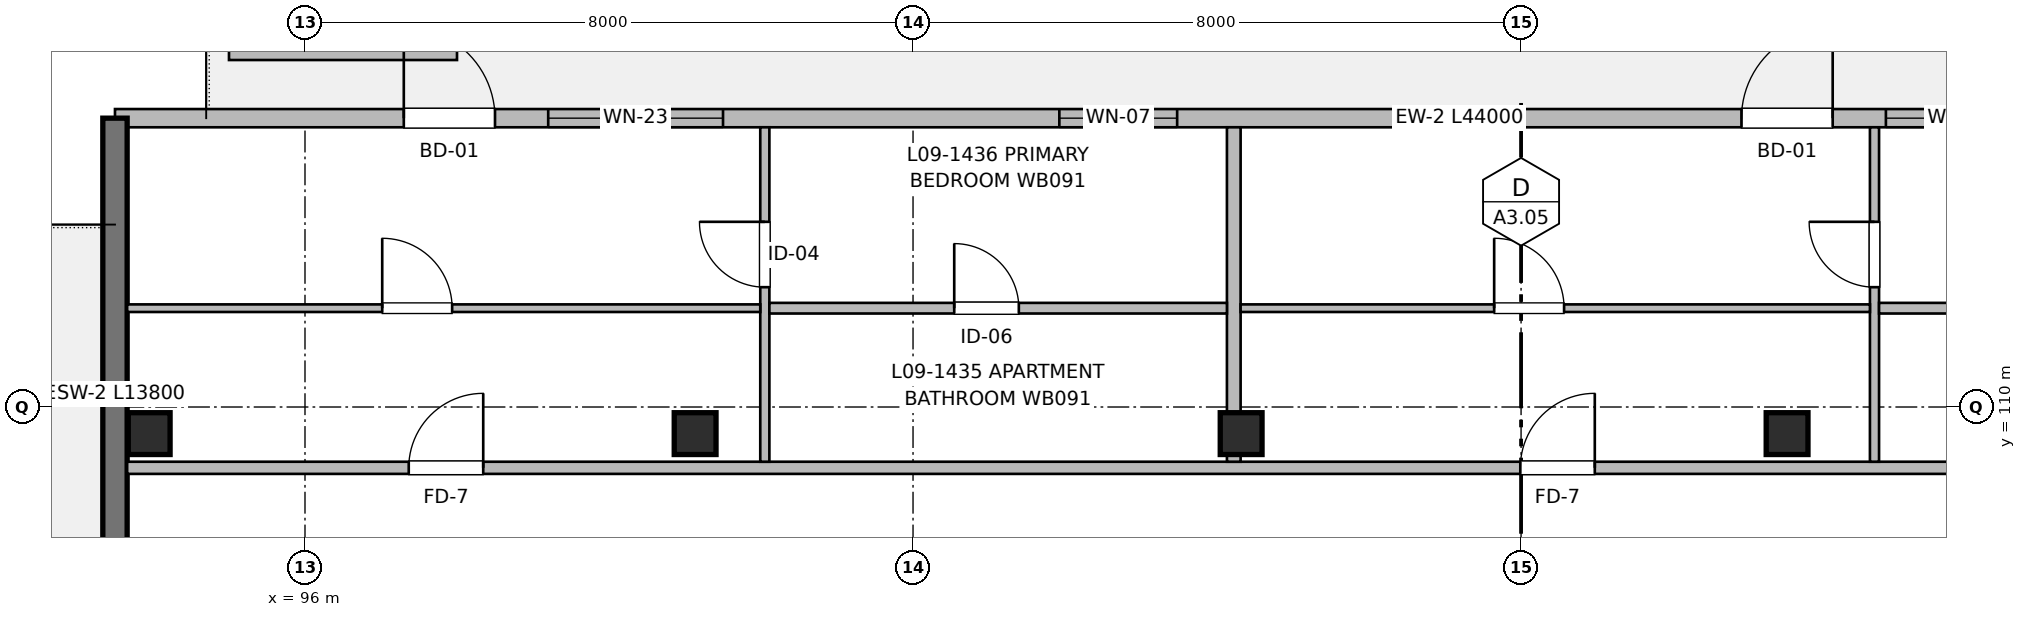
"""IFC4 building model, lengths in metres.
Left out: names, types, materials, properties, quantities, classifications, styles, units other than length and angle.
Written with IfcOpenShell. Run it as: python <this file> out.ifc"""

import sys

from ifc_helpers import new_model, si_unit, direction, frame, frame_2d, origin, origin_2d, place, context, subcontext, project, spatial, rectangle, extrude, element, fill, save


model = new_model("IFC4")
c1 = context("Model", 3, precision=1e-05, world=origin(), true_north=direction((0.0, 1.0)))
c2 = subcontext(c1, "Body", "Model", "MODEL_VIEW")
j1 = project(units=[si_unit("LENGTHUNIT", "METRE"), si_unit("PLANEANGLEUNIT", "RADIAN")], contexts=[c1])
p1 = place(None, origin())
s1 = spatial("IfcSite", under=j1, at=p1, CompositionType="ELEMENT")
p2 = place(p1, origin())
s2 = spatial("IfcBuilding", under=s1, at=p2, CompositionType="ELEMENT")
p3 = place(p2, frame((0.0, 0.0, 29.76)))
s3 = spatial("IfcBuildingStorey", under=s2, at=p3, CompositionType="ELEMENT", Elevation=29.76)
for number, where, z_axis, x_axis in (
    (1, (93.95, 109.65, 0.0), (0.0, 0.0, 1.0), (1.0, 0.0, 0.0)),
    (2, (101.133, 109.65, 0.0), (0.0, 0.0, 1.0), (1.0, 0.0, 0.0)),
    (3, (108.317, 109.65, 0.0), (0.0, 0.0, 1.0), (1.0, 0.0, 0.0)),
    (4, (115.5, 109.65, 0.0), (0.0, 0.0, 1.0), (1.0, 0.0, 0.0)),
):
    element("IfcColumn", number, at=place(p3, frame(where, z_axis=z_axis, x_axis=x_axis)), inside=s3, PredefinedType="COLUMN", context=c2, shape_type="SweptSolid", body=[
        extrude(rectangle(XDim=0.55, YDim=0.55, at=origin_2d()), origin(), (0.0, 0.0, 1.0), 3.2),
    ])
p4 = place(p3, frame((93.5, 113.8, 0.0), z_axis=(0.0, 0.0, 1.0), x_axis=(1.0, 0.0, 0.0)))
e5 = element("IfcWall", 5, at=p4, inside=s3, PredefinedType="SOLIDWALL", context=c2, shape_type="SweptSolid", body=[
    extrude(rectangle(XDim=44.0, YDim=0.24, at=frame_2d((22.0, 0.0))), origin(), (0.0, 0.0, 1.0), 2.98),
])
p5 = place(p4, frame((3.8, 0.0, 0.0)))
e6 = element("IfcOpeningElement", 6, at=p5, cuts=e5, PredefinedType="OPENING", context=c2, shape_type="SweptSolid", body=[
    extrude(rectangle(XDim=1.2, YDim=2.2, at=frame_2d((0.6, 1.1))), frame((0.0, 0.13, 0.0), z_axis=(0.0, -1.0, 0.0), x_axis=(1.0, 0.0, 0.0)), (0.0, 0.0, 1.0), 0.26),
])
p6 = place(p4, frame((5.7, 0.0, 0.57)))
e7 = element("IfcOpeningElement", 7, at=p6, cuts=e5, PredefinedType="OPENING", context=c2, shape_type="SweptSolid", body=[
    extrude(rectangle(XDim=2.3, YDim=1.65, at=frame_2d((1.15, 0.825))), frame((0.0, 0.13, 0.0), z_axis=(0.0, -1.0, 0.0), x_axis=(1.0, 0.0, 0.0)), (0.0, 0.0, 1.0), 0.26),
])
p7 = place(p4, frame((12.425, 0.0, 0.82)))
e8 = element("IfcOpeningElement", 8, at=p7, cuts=e5, PredefinedType="OPENING", context=c2, shape_type="SweptSolid", body=[
    extrude(rectangle(XDim=1.55, YDim=1.4, at=frame_2d((0.775, 0.7))), frame((0.0, 0.13, 0.0), z_axis=(0.0, -1.0, 0.0), x_axis=(1.0, 0.0, 0.0)), (0.0, 0.0, 1.0), 0.26),
])
p8 = place(p4, frame((21.4, 0.0, 0.0)))
e9 = element("IfcOpeningElement", 9, at=p8, cuts=e5, PredefinedType="OPENING", context=c2, shape_type="SweptSolid", body=[
    extrude(rectangle(XDim=1.2, YDim=2.2, at=frame_2d((0.6, 1.1))), frame((0.0, 0.13, 0.0), z_axis=(0.0, -1.0, 0.0), x_axis=(1.0, 0.0, 0.0)), (0.0, 0.0, 1.0), 0.26),
])
p9 = place(p4, frame((23.3, 0.0, 0.72)))
e10 = element("IfcOpeningElement", 10, at=p9, cuts=e5, PredefinedType="OPENING", context=c2, shape_type="SweptSolid", body=[
    extrude(rectangle(XDim=1.95, YDim=1.5, at=frame_2d((0.975, 0.75))), frame((0.0, 0.13, 0.0), z_axis=(0.0, -1.0, 0.0), x_axis=(1.0, 0.0, 0.0)), (0.0, 0.0, 1.0), 0.26),
])
p10 = place(p4, frame((30.175, 0.0, 0.87)))
e11 = element("IfcOpeningElement", 11, at=p10, cuts=e5, PredefinedType="OPENING", context=c2, shape_type="SweptSolid", body=[
    extrude(rectangle(XDim=1.25, YDim=1.35, at=frame_2d((0.625, 0.675))), frame((0.0, 0.13, 0.0), z_axis=(0.0, -1.0, 0.0), x_axis=(1.0, 0.0, 0.0)), (0.0, 0.0, 1.0), 0.26),
])
p11 = place(p4, frame((39.0, 0.0, 0.0)))
e12 = element("IfcOpeningElement", 12, at=p11, cuts=e5, PredefinedType="OPENING", context=c2, shape_type="SweptSolid", body=[
    extrude(rectangle(XDim=1.2, YDim=2.2, at=frame_2d((0.6, 1.1))), frame((0.0, 0.13, 0.0), z_axis=(0.0, -1.0, 0.0), x_axis=(1.0, 0.0, 0.0)), (0.0, 0.0, 1.0), 0.26),
])
p12 = place(p4, frame((40.9, 0.0, 0.72)))
e13 = element("IfcOpeningElement", 13, at=p12, cuts=e5, PredefinedType="OPENING", context=c2, shape_type="SweptSolid", body=[
    extrude(rectangle(XDim=1.68, YDim=1.5, at=frame_2d((0.84, 0.75))), frame((0.0, 0.13, 0.0), z_axis=(0.0, -1.0, 0.0), x_axis=(1.0, 0.0, 0.0)), (0.0, 0.0, 1.0), 0.26),
])
p13 = place(p3, frame((93.5, 100.0, 0.0), z_axis=(0.0, 0.0, 1.0), x_axis=(0.0, 1.0, 0.0)))
e14 = element("IfcWall", 14, at=p13, inside=s3, PredefinedType="SHEAR", context=c2, shape_type="SweptSolid", body=[
    extrude(rectangle(XDim=13.8, YDim=0.32, at=frame_2d((6.9, 0.0))), origin(), (0.0, 0.0, 1.0), 2.98),
])
p14 = place(p13, frame((5.0, 0.0, 0.0)))
e15 = element("IfcOpeningElement", 15, at=p14, cuts=e14, PredefinedType="OPENING", context=c2, shape_type="SweptSolid", body=[
    extrude(rectangle(XDim=1.2, YDim=2.2, at=frame_2d((0.6, 1.1))), frame((0.0, 0.17, 0.0), z_axis=(0.0, -1.0, 0.0), x_axis=(1.0, 0.0, 0.0)), (0.0, 0.0, 1.0), 0.34),
])
p15 = place(p3, frame((95.0, 114.65, 0.0), z_axis=(0.0, 0.0, 1.0), x_axis=(1.0, 0.0, 0.0)))
e16 = element("IfcWall", 16, at=p15, inside=s3, PredefinedType="PARAPET", context=c2, shape_type="SweptSolid", body=[
    extrude(rectangle(XDim=3.0, YDim=0.17, at=frame_2d((1.5, 0.0))), origin(), (0.0, 0.0, 1.0), 0.45),
])
p16 = place(p3, frame((93.66, 109.2, 0.0), z_axis=(0.0, 0.0, 1.0), x_axis=(1.0, 0.0, 0.0)))
e17 = element("IfcWall", 17, at=p16, inside=s3, PredefinedType="PARTITIONING", context=c2, shape_type="SweptSolid", body=[
    extrude(rectangle(XDim=43.68, YDim=0.16, at=frame_2d((21.84, 0.0))), origin(), (0.0, 0.0, 1.0), 2.935),
])
p17 = place(p16, frame((3.705, 0.0, 0.0)))
e18 = element("IfcOpeningElement", 18, at=p17, cuts=e17, PredefinedType="OPENING", context=c2, shape_type="SweptSolid", body=[
    extrude(rectangle(XDim=0.98, YDim=2.15, at=frame_2d((0.49, 1.075))), frame((0.0, 0.09, 0.0), z_axis=(0.0, -1.0, 0.0), x_axis=(1.0, 0.0, 0.0)), (0.0, 0.0, 1.0), 0.18),
])
p18 = place(p16, frame((18.33, 0.0, 0.0)))
e19 = element("IfcOpeningElement", 19, at=p18, cuts=e17, PredefinedType="OPENING", context=c2, shape_type="SweptSolid", body=[
    extrude(rectangle(XDim=0.98, YDim=2.15, at=frame_2d((0.49, 1.075))), frame((0.0, 0.09, 0.0), z_axis=(0.0, -1.0, 0.0), x_axis=(1.0, 0.0, 0.0)), (0.0, 0.0, 1.0), 0.18),
])
p19 = place(p16, frame((32.915, 0.0, 0.0)))
e20 = element("IfcOpeningElement", 20, at=p19, cuts=e17, PredefinedType="OPENING", context=c2, shape_type="SweptSolid", body=[
    extrude(rectangle(XDim=0.98, YDim=2.15, at=frame_2d((0.49, 1.075))), frame((0.0, 0.09, 0.0), z_axis=(0.0, -1.0, 0.0), x_axis=(1.0, 0.0, 0.0)), (0.0, 0.0, 1.0), 0.18),
])
p20 = place(p3, frame((108.22, 109.28, 0.0), z_axis=(0.0, 0.0, 1.0), x_axis=(0.0, 1.0, 0.0)))
e21 = element("IfcWall", 21, at=p20, inside=s3, PredefinedType="PARTITIONING", context=c2, shape_type="SweptSolid", body=[
    extrude(rectangle(XDim=4.4, YDim=0.18, at=frame_2d((2.2, 0.0))), origin(), (0.0, 0.0, 1.0), 2.935),
])
p21 = place(p3, frame((102.05, 109.28, 0.0), z_axis=(0.0, 0.0, 1.0), x_axis=(0.0, 1.0, 0.0)))
e22 = element("IfcWall", 22, at=p21, inside=s3, PredefinedType="PARTITIONING", context=c2, shape_type="SweptSolid", body=[
    extrude(rectangle(XDim=4.4, YDim=0.12, at=frame_2d((2.2, 0.0))), origin(), (0.0, 0.0, 1.0), 2.935),
])
p22 = place(p21, frame((2.296, 0.0, 0.0)))
e23 = element("IfcOpeningElement", 23, at=p22, cuts=e22, PredefinedType="OPENING", context=c2, shape_type="SweptSolid", body=[
    extrude(rectangle(XDim=0.86, YDim=2.1, at=frame_2d((0.43, 1.05))), frame((0.0, 0.07, 0.0), z_axis=(0.0, -1.0, 0.0), x_axis=(1.0, 0.0, 0.0)), (0.0, 0.0, 1.0), 0.14),
])
p23 = place(p3, frame((102.11, 111.3, 0.0), z_axis=(0.0, 0.0, 1.0), x_axis=(1.0, 0.0, 0.0)))
e24 = element("IfcWall", 24, at=p23, inside=s3, PredefinedType="PARTITIONING", context=c2, shape_type="SweptSolid", body=[
    extrude(rectangle(XDim=6.02, YDim=0.14, at=frame_2d((3.01, 0.0))), origin(), (0.0, 0.0, 1.0), 2.935),
])
p24 = place(p23, frame((2.432, 0.0, 0.0)))
e25 = element("IfcOpeningElement", 25, at=p24, cuts=e24, PredefinedType="OPENING", context=c2, shape_type="SweptSolid", body=[
    extrude(rectangle(XDim=0.85, YDim=2.05, at=frame_2d((0.425, 1.025))), frame((0.0, 0.08, 0.0), z_axis=(0.0, -1.0, 0.0), x_axis=(1.0, 0.0, 0.0)), (0.0, 0.0, 1.0), 0.16),
])
p25 = place(p3, frame((93.66, 111.3, 0.0), z_axis=(0.0, 0.0, 1.0), x_axis=(1.0, 0.0, 0.0)))
e26 = element("IfcWall", 26, at=p25, inside=s3, PredefinedType="PARTITIONING", context=c2, shape_type="SweptSolid", body=[
    extrude(rectangle(XDim=8.33, YDim=0.1, at=frame_2d((4.165, 0.0))), origin(), (0.0, 0.0, 1.0), 2.935),
])
p26 = place(p25, frame((3.356, 0.0, 0.0)))
e27 = element("IfcOpeningElement", 27, at=p26, cuts=e26, PredefinedType="OPENING", context=c2, shape_type="SweptSolid", body=[
    extrude(rectangle(XDim=0.92, YDim=2.1, at=frame_2d((0.46, 1.05))), frame((0.0, 0.06, 0.0), z_axis=(0.0, -1.0, 0.0), x_axis=(1.0, 0.0, 0.0)), (0.0, 0.0, 1.0), 0.12),
])
p27 = place(p3, frame((116.65, 109.28, 0.0), z_axis=(0.0, 0.0, 1.0), x_axis=(0.0, 1.0, 0.0)))
e28 = element("IfcWall", 28, at=p27, inside=s3, PredefinedType="PARTITIONING", context=c2, shape_type="SweptSolid", body=[
    extrude(rectangle(XDim=4.4, YDim=0.12, at=frame_2d((2.2, 0.0))), origin(), (0.0, 0.0, 1.0), 2.935),
])
p28 = place(p27, frame((2.296, 0.0, 0.0)))
e29 = element("IfcOpeningElement", 29, at=p28, cuts=e28, PredefinedType="OPENING", context=c2, shape_type="SweptSolid", body=[
    extrude(rectangle(XDim=0.86, YDim=2.1, at=frame_2d((0.43, 1.05))), frame((0.0, 0.07, 0.0), z_axis=(0.0, -1.0, 0.0), x_axis=(1.0, 0.0, 0.0)), (0.0, 0.0, 1.0), 0.14),
])
p29 = place(p3, frame((116.71, 111.3, 0.0), z_axis=(0.0, 0.0, 1.0), x_axis=(1.0, 0.0, 0.0)))
e30 = element("IfcWall", 30, at=p29, inside=s3, PredefinedType="PARTITIONING", context=c2, shape_type="SweptSolid", body=[
    extrude(rectangle(XDim=5.98, YDim=0.14, at=frame_2d((2.99, 0.0))), origin(), (0.0, 0.0, 1.0), 2.935),
])
p30 = place(p29, frame((2.416, 0.0, 0.0)))
e31 = element("IfcOpeningElement", 31, at=p30, cuts=e30, PredefinedType="OPENING", context=c2, shape_type="SweptSolid", body=[
    extrude(rectangle(XDim=0.85, YDim=2.05, at=frame_2d((0.425, 1.025))), frame((0.0, 0.08, 0.0), z_axis=(0.0, -1.0, 0.0), x_axis=(1.0, 0.0, 0.0)), (0.0, 0.0, 1.0), 0.16),
])
p31 = place(p3, frame((108.31, 111.3, 0.0), z_axis=(0.0, 0.0, 1.0), x_axis=(1.0, 0.0, 0.0)))
e32 = element("IfcWall", 32, at=p31, inside=s3, PredefinedType="PARTITIONING", context=c2, shape_type="SweptSolid", body=[
    extrude(rectangle(XDim=8.28, YDim=0.1, at=frame_2d((4.14, 0.0))), origin(), (0.0, 0.0, 1.0), 2.935),
])
p32 = place(p31, frame((3.336, 0.0, 0.0)))
e33 = element("IfcOpeningElement", 33, at=p32, cuts=e32, PredefinedType="OPENING", context=c2, shape_type="SweptSolid", body=[
    extrude(rectangle(XDim=0.92, YDim=2.1, at=frame_2d((0.46, 1.05))), frame((0.0, 0.06, 0.0), z_axis=(0.0, -1.0, 0.0), x_axis=(1.0, 0.0, 0.0)), (0.0, 0.0, 1.0), 0.12),
])
p33 = place(p5, origin())
e34 = element("IfcDoor", 34, at=p33, inside=s3, OperationType="SINGLE_SWING_LEFT", PredefinedType="DOOR", context=c2, shape_type="SweptSolid", body=[
    extrude(rectangle(XDim=1.2, YDim=2.2, at=frame_2d((0.6, 1.1))), frame((0.0, 0.025, 0.0), z_axis=(0.0, -1.0, 0.0), x_axis=(1.0, 0.0, 0.0)), (0.0, 0.0, 1.0), 0.05),
])
fill(e6, e34)
p34 = place(p6, origin())
e35 = element("IfcWindow", 35, at=p34, inside=s3, PartitioningType="SINGLE_PANEL", PredefinedType="WINDOW", context=c2, shape_type="SweptSolid", body=[
    extrude(rectangle(XDim=2.3, YDim=1.65, at=frame_2d((1.15, 0.825))), frame((0.0, 0.03, 0.0), z_axis=(0.0, -1.0, 0.0), x_axis=(1.0, 0.0, 0.0)), (0.0, 0.0, 1.0), 0.06),
])
fill(e7, e35)
p35 = place(p7, origin())
e36 = element("IfcWindow", 36, at=p35, inside=s3, PartitioningType="SINGLE_PANEL", PredefinedType="WINDOW", context=c2, shape_type="SweptSolid", body=[
    extrude(rectangle(XDim=1.55, YDim=1.4, at=frame_2d((0.775, 0.7))), frame((0.0, 0.03, 0.0), z_axis=(0.0, -1.0, 0.0), x_axis=(1.0, 0.0, 0.0)), (0.0, 0.0, 1.0), 0.06),
])
fill(e8, e36)
p36 = place(p8, origin())
e37 = element("IfcDoor", 37, at=p36, inside=s3, OperationType="SINGLE_SWING_RIGHT", PredefinedType="DOOR", context=c2, shape_type="SweptSolid", body=[
    extrude(rectangle(XDim=1.2, YDim=2.2, at=frame_2d((0.6, 1.1))), frame((0.0, 0.025, 0.0), z_axis=(0.0, -1.0, 0.0), x_axis=(1.0, 0.0, 0.0)), (0.0, 0.0, 1.0), 0.05),
])
fill(e9, e37)
p37 = place(p9, origin())
e38 = element("IfcWindow", 38, at=p37, inside=s3, PartitioningType="SINGLE_PANEL", PredefinedType="WINDOW", context=c2, shape_type="SweptSolid", body=[
    extrude(rectangle(XDim=1.95, YDim=1.5, at=frame_2d((0.975, 0.75))), frame((0.0, 0.03, 0.0), z_axis=(0.0, -1.0, 0.0), x_axis=(1.0, 0.0, 0.0)), (0.0, 0.0, 1.0), 0.06),
])
fill(e10, e38)
p38 = place(p17, origin())
e39 = element("IfcDoor", 39, at=p38, inside=s3, OperationType="SINGLE_SWING_RIGHT", PredefinedType="DOOR", context=c2, shape_type="SweptSolid", body=[
    extrude(rectangle(XDim=0.98, YDim=2.15, at=frame_2d((0.49, 1.075))), frame((0.0, 0.025, 0.0), z_axis=(0.0, -1.0, 0.0), x_axis=(1.0, 0.0, 0.0)), (0.0, 0.0, 1.0), 0.05),
])
fill(e18, e39)
p39 = place(p26, origin())
e40 = element("IfcDoor", 40, at=p39, inside=s3, OperationType="SINGLE_SWING_LEFT", PredefinedType="DOOR", context=c2, shape_type="SweptSolid", body=[
    extrude(rectangle(XDim=0.92, YDim=2.1, at=frame_2d((0.46, 1.05))), frame((0.0, 0.025, 0.0), z_axis=(0.0, -1.0, 0.0), x_axis=(1.0, 0.0, 0.0)), (0.0, 0.0, 1.0), 0.05),
])
fill(e27, e40)
p40 = place(p22, origin())
e41 = element("IfcDoor", 41, at=p40, inside=s3, OperationType="SINGLE_SWING_RIGHT", PredefinedType="DOOR", context=c2, shape_type="SweptSolid", body=[
    extrude(rectangle(XDim=0.86, YDim=2.1, at=frame_2d((0.43, 1.05))), frame((0.0, 0.025, 0.0), z_axis=(0.0, -1.0, 0.0), x_axis=(1.0, 0.0, 0.0)), (0.0, 0.0, 1.0), 0.05),
])
fill(e23, e41)
p41 = place(p24, origin())
e42 = element("IfcDoor", 42, at=p41, inside=s3, OperationType="SINGLE_SWING_LEFT", PredefinedType="DOOR", context=c2, shape_type="SweptSolid", body=[
    extrude(rectangle(XDim=0.85, YDim=2.05, at=frame_2d((0.425, 1.025))), frame((0.0, 0.025, 0.0), z_axis=(0.0, -1.0, 0.0), x_axis=(1.0, 0.0, 0.0)), (0.0, 0.0, 1.0), 0.05),
])
fill(e25, e42)
p42 = place(p18, origin())
e43 = element("IfcDoor", 43, at=p42, inside=s3, OperationType="SINGLE_SWING_RIGHT", PredefinedType="DOOR", context=c2, shape_type="SweptSolid", body=[
    extrude(rectangle(XDim=0.98, YDim=2.15, at=frame_2d((0.49, 1.075))), frame((0.0, 0.025, 0.0), z_axis=(0.0, -1.0, 0.0), x_axis=(1.0, 0.0, 0.0)), (0.0, 0.0, 1.0), 0.05),
])
fill(e19, e43)
p43 = place(p32, origin())
e44 = element("IfcDoor", 44, at=p43, inside=s3, OperationType="SINGLE_SWING_LEFT", PredefinedType="DOOR", context=c2, shape_type="SweptSolid", body=[
    extrude(rectangle(XDim=0.92, YDim=2.1, at=frame_2d((0.46, 1.05))), frame((0.0, 0.025, 0.0), z_axis=(0.0, -1.0, 0.0), x_axis=(1.0, 0.0, 0.0)), (0.0, 0.0, 1.0), 0.05),
])
fill(e33, e44)
p44 = place(p28, origin())
e45 = element("IfcDoor", 45, at=p44, inside=s3, OperationType="SINGLE_SWING_RIGHT", PredefinedType="DOOR", context=c2, shape_type="SweptSolid", body=[
    extrude(rectangle(XDim=0.86, YDim=2.1, at=frame_2d((0.43, 1.05))), frame((0.0, 0.025, 0.0), z_axis=(0.0, -1.0, 0.0), x_axis=(1.0, 0.0, 0.0)), (0.0, 0.0, 1.0), 0.05),
])
fill(e29, e45)
save(model, sys.argv[1])
